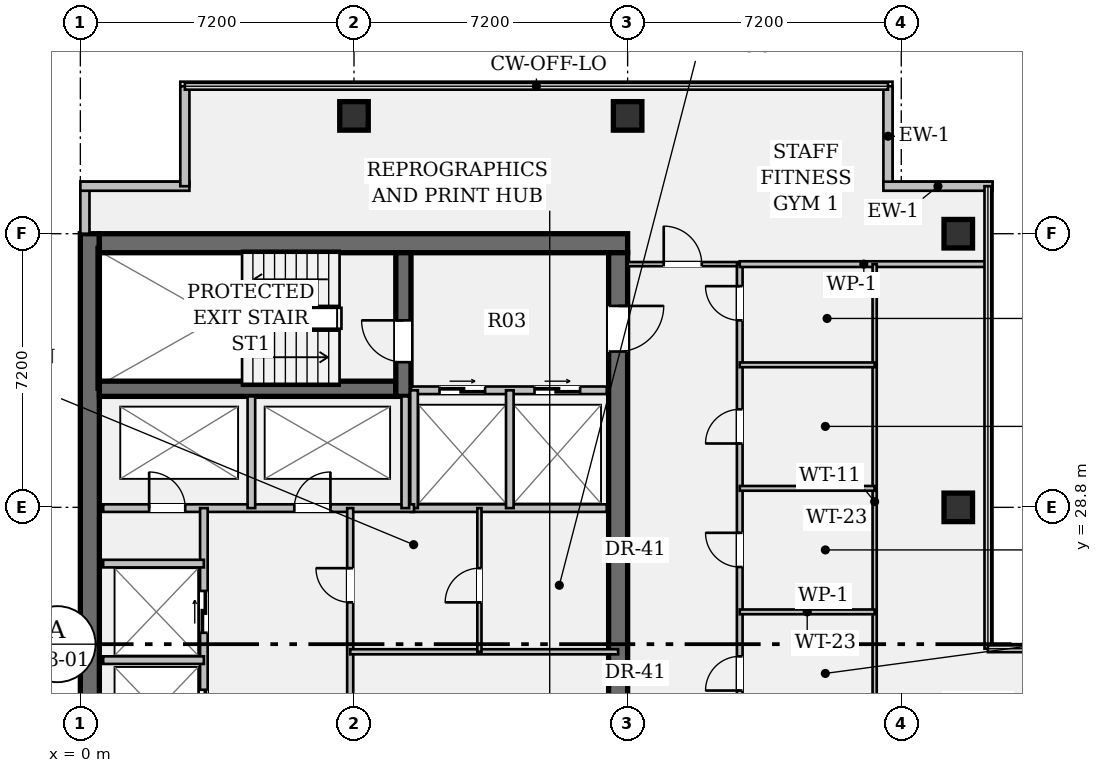
"""IFC4 building model, lengths in metres.
Left out: names, types, materials, properties, quantities, classifications, styles, units other than length and angle.
Written with IfcOpenShell. Run it as: python <this file> out.ifc"""

import sys

from ifc_helpers import new_model, si_unit, direction, frame, frame_2d, origin, origin_2d, place, context, subcontext, project, spatial, rectangle, hollow_rectangle, extrude, element, fill, save


model = new_model("IFC4")
c1 = context("Model", 3, precision=1e-05, world=origin(), true_north=direction((0.0, 1.0)))
c2 = subcontext(c1, "Body", "Model", "MODEL_VIEW")
j1 = project(units=[si_unit("LENGTHUNIT", "METRE"), si_unit("PLANEANGLEUNIT", "RADIAN")], contexts=[c1])
p1 = place(None, origin())
s1 = spatial("IfcSite", under=j1, at=p1, CompositionType="ELEMENT")
p2 = place(p1, origin())
s2 = spatial("IfcBuilding", under=s1, at=p2, CompositionType="ELEMENT")
p3 = place(p2, frame((0.0, 0.0, 215.25)))
s3 = spatial("IfcBuildingStorey", under=s2, at=p3, CompositionType="ELEMENT", Elevation=215.25)
p4 = place(p3, frame((0.25, 7.2, 0.0), z_axis=(0.0, 0.0, 1.0), x_axis=(0.0, 1.0, 0.0)))
e1 = element("IfcWall", 1, at=p4, inside=s3, PredefinedType="SHEAR", context=c2, shape_type="SweptSolid", body=[
    extrude(rectangle(XDim=28.8, YDim=0.5, at=frame_2d((14.4, 0.0))), origin(), (0.0, 0.0, 1.0), 3.24),
])
p5 = place(p3, frame((0.5, 35.75, 0.0), z_axis=(0.0, 0.0, 1.0), x_axis=(1.0, 0.0, 0.0)))
e2 = element("IfcWall", 2, at=p5, inside=s3, PredefinedType="SHEAR", context=c2, shape_type="SweptSolid", body=[
    extrude(rectangle(XDim=13.9, YDim=0.5, at=frame_2d((6.95, 0.0))), origin(), (0.0, 0.0, 1.0), 3.24),
])
p6 = place(p3, frame((14.15, 35.5, 0.0), z_axis=(0.0, 0.0, 1.0), x_axis=(0.0, -1.0, 0.0)))
e3 = element("IfcWall", 3, at=p6, inside=s3, PredefinedType="SHEAR", context=c2, shape_type="SweptSolid", body=[
    extrude(rectangle(XDim=27.8, YDim=0.5, at=frame_2d((13.9, 0.0))), origin(), (0.0, 0.0, 1.0), 3.24),
])
p7 = place(p6, frame((1.4, 0.0, 0.0)))
e4 = element("IfcOpeningElement", 4, at=p7, cuts=e3, PredefinedType="OPENING", context=c2, shape_type="SweptSolid", body=[
    extrude(rectangle(XDim=1.2, YDim=2.15, at=frame_2d((0.6, 1.075))), frame((0.0, 0.262, 0.0), z_axis=(0.0, -1.0, 0.0), x_axis=(1.0, 0.0, 0.0)), (0.0, 0.0, 1.0), 0.524),
])
p8 = place(p6, frame((25.35, 0.0, 0.0)))
e5 = element("IfcOpeningElement", 5, at=p8, cuts=e3, PredefinedType="OPENING", context=c2, shape_type="SweptSolid", body=[
    extrude(rectangle(XDim=1.2, YDim=2.15, at=frame_2d((0.6, 1.075))), frame((0.0, 0.262, 0.0), z_axis=(0.0, -1.0, 0.0), x_axis=(1.0, 0.0, 0.0)), (0.0, 0.0, 1.0), 0.524),
])
p9 = place(p6, frame((14.7, 0.0, 0.0)))
e6 = element("IfcOpeningElement", 6, at=p9, cuts=e3, PredefinedType="OPENING", context=c2, shape_type="SweptSolid", body=[
    extrude(rectangle(XDim=1.6, YDim=2.2, at=frame_2d((0.8, 1.1))), frame((0.0, 0.262, 0.0), z_axis=(0.0, -1.0, 0.0), x_axis=(1.0, 0.0, 0.0)), (0.0, 0.0, 1.0), 0.524),
])
p10 = place(p3, frame((0.5, 31.92, 0.0), z_axis=(0.0, 0.0, 1.0), x_axis=(1.0, 0.0, 0.0)))
e7 = element("IfcWall", 7, at=p10, inside=s3, PredefinedType="SHEAR", context=c2, shape_type="SweptSolid", body=[
    extrude(rectangle(XDim=7.8, YDim=0.4, at=frame_2d((3.9, 0.0))), origin(), (0.0, 0.0, 1.0), 3.24),
])
p11 = place(p3, frame((8.5, 31.72, 0.0), z_axis=(0.0, 0.0, 1.0), x_axis=(0.0, 1.0, 0.0)))
e8 = element("IfcWall", 8, at=p11, inside=s3, PredefinedType="SHEAR", context=c2, shape_type="SweptSolid", body=[
    extrude(rectangle(XDim=3.78, YDim=0.4, at=frame_2d((1.89, 0.0))), origin(), (0.0, 0.0, 1.0), 3.24),
])
p12 = place(p11, frame((0.9, 0.0, 0.0)))
e9 = element("IfcOpeningElement", 9, at=p12, cuts=e8, PredefinedType="OPENING", context=c2, shape_type="SweptSolid", body=[
    extrude(rectangle(XDim=1.1, YDim=2.15, at=frame_2d((0.55, 1.075))), frame((0.0, 0.212, 0.0), z_axis=(0.0, -1.0, 0.0), x_axis=(1.0, 0.0, 0.0)), (0.0, 0.0, 1.0), 0.424),
])
for number, where, z_axis, x_axis in (
    (10, (7.2, 39.1, 0.0), (0.0, 0.0, 1.0), (1.0, 0.0, 0.0)),
    (11, (14.4, 39.1, 0.0), (0.0, 0.0, 1.0), (1.0, 0.0, 0.0)),
    (12, (23.1, 28.8, 0.0), (0.0, 0.0, 1.0), (1.0, 0.0, 0.0)),
    (13, (23.1, 36.0, 0.0), (0.0, 0.0, 1.0), (1.0, 0.0, 0.0)),
):
    element("IfcColumn", number, at=place(p3, frame(where, z_axis=z_axis, x_axis=x_axis)), inside=s3, PredefinedType="COLUMN", context=c2, shape_type="SweptSolid", body=[
        extrude(hollow_rectangle(XDim=0.75, YDim=0.75, WallThickness=0.045, at=origin_2d()), origin(), (0.0, 0.0, 1.0), 3.24),
    ])
p13 = place(p3, frame((0.12, 36.0, 0.0), z_axis=(0.0, 0.0, 1.0), x_axis=(0.0, 1.0, 0.0)))
e14 = element("IfcWall", 14, at=p13, inside=s3, PredefinedType="STANDARD", context=c2, shape_type="SweptSolid", body=[
    extrude(rectangle(XDim=1.25, YDim=0.24, at=frame_2d((0.625, 0.0))), origin(), (0.0, 0.0, 1.0), 3.24),
])
p14 = place(p3, frame((0.0, 37.25, 0.0), z_axis=(0.0, 0.0, 1.0), x_axis=(1.0, 0.0, 0.0)))
e15 = element("IfcWall", 15, at=p14, inside=s3, PredefinedType="STANDARD", context=c2, shape_type="SweptSolid", body=[
    extrude(rectangle(XDim=2.87, YDim=0.24, at=frame_2d((1.435, 0.0))), origin(), (0.0, 0.0, 1.0), 3.24),
])
for number, where, z_axis, x_axis in (
    (16, (2.75, 37.25, 0.0), (0.0, 0.0, 1.0), (0.0, 1.0, 0.0)),
    (17, (21.25, 39.88, 0.0), (0.0, 0.0, 1.0), (0.0, -1.0, 0.0)),
):
    element("IfcWall", number, at=place(p3, frame(where, z_axis=z_axis, x_axis=x_axis)), inside=s3, PredefinedType="STANDARD", context=c2, shape_type="SweptSolid", body=[
        extrude(rectangle(XDim=2.63, YDim=0.24, at=frame_2d((1.315, 0.0))), origin(), (0.0, 0.0, 1.0), 3.24),
    ])
p15 = place(p3, frame((21.13, 37.25, 0.0), z_axis=(0.0, 0.0, 1.0), x_axis=(1.0, 0.0, 0.0)))
e18 = element("IfcWall", 18, at=p15, inside=s3, PredefinedType="STANDARD", context=c2, shape_type="SweptSolid", body=[
    extrude(rectangle(XDim=2.87, YDim=0.24, at=frame_2d((1.435, 0.0))), origin(), (0.0, 0.0, 1.0), 3.24),
])
p16 = place(p3, frame((8.7, 31.88, 0.0), z_axis=(0.0, 0.0, 1.0), x_axis=(1.0, 0.0, 0.0)))
e19 = element("IfcWall", 19, at=p16, inside=s3, PredefinedType="PARTITIONING", context=c2, shape_type="SweptSolid", body=[
    extrude(rectangle(XDim=5.15, YDim=0.2, at=frame_2d((2.575, 0.0))), origin(), (0.0, 0.0, 1.0), 3.24),
])
p17 = place(p16, frame((0.75, 0.0, 0.0)))
e20 = element("IfcOpeningElement", 20, at=p17, cuts=e19, PredefinedType="OPENING", context=c2, shape_type="SweptSolid", body=[
    extrude(rectangle(XDim=1.2, YDim=2.2, at=frame_2d((0.6, 1.1))), frame((0.0, 0.112, 0.0), z_axis=(0.0, -1.0, 0.0), x_axis=(1.0, 0.0, 0.0)), (0.0, 0.0, 1.0), 0.224),
])
p18 = place(p16, frame((3.25, 0.0, 0.0)))
e21 = element("IfcOpeningElement", 21, at=p18, cuts=e19, PredefinedType="OPENING", context=c2, shape_type="SweptSolid", body=[
    extrude(rectangle(XDim=1.2, YDim=2.2, at=frame_2d((0.6, 1.1))), frame((0.0, 0.112, 0.0), z_axis=(0.0, -1.0, 0.0), x_axis=(1.0, 0.0, 0.0)), (0.0, 0.0, 1.0), 0.224),
])
p19 = place(p3, frame((8.7, 28.78, 0.0), z_axis=(0.0, 0.0, 1.0), x_axis=(1.0, 0.0, 0.0)))
e22 = element("IfcWall", 22, at=p19, inside=s3, PredefinedType="PARTITIONING", context=c2, shape_type="SweptSolid", body=[
    extrude(rectangle(XDim=5.15, YDim=0.2, at=frame_2d((2.575, 0.0))), origin(), (0.0, 0.0, 1.0), 3.24),
])
for number, where, z_axis, x_axis in (
    (23, (8.78, 28.78, 0.0), (0.0, 0.0, 1.0), (0.0, 1.0, 0.0)),
    (24, (11.3, 28.78, 0.0), (0.0, 0.0, 1.0), (0.0, 1.0, 0.0)),
):
    element("IfcWall", number, at=place(p3, frame(where, z_axis=z_axis, x_axis=x_axis)), inside=s3, PredefinedType="PARTITIONING", context=c2, shape_type="SweptSolid", body=[
        extrude(rectangle(XDim=3.1, YDim=0.2, at=frame_2d((1.55, 0.0))), origin(), (0.0, 0.0, 1.0), 3.24),
    ])
p20 = place(p3, frame((0.6, 28.78, 0.0), z_axis=(0.0, 0.0, 1.0), x_axis=(1.0, 0.0, 0.0)))
e25 = element("IfcWall", 25, at=p20, inside=s3, PredefinedType="PARTITIONING", context=c2, shape_type="SweptSolid", body=[
    extrude(rectangle(XDim=8.18, YDim=0.2, at=frame_2d((4.09, 0.0))), origin(), (0.0, 0.0, 1.0), 3.24),
])
p21 = place(p20, frame((1.21, 0.0, 0.0)))
e26 = element("IfcOpeningElement", 26, at=p21, cuts=e25, PredefinedType="OPENING", context=c2, shape_type="SweptSolid", body=[
    extrude(rectangle(XDim=0.95, YDim=2.15, at=frame_2d((0.475, 1.075))), frame((0.0, 0.112, 0.0), z_axis=(0.0, -1.0, 0.0), x_axis=(1.0, 0.0, 0.0)), (0.0, 0.0, 1.0), 0.224),
])
p22 = place(p20, frame((5.03, 0.0, 0.0)))
e27 = element("IfcOpeningElement", 27, at=p22, cuts=e25, PredefinedType="OPENING", context=c2, shape_type="SweptSolid", body=[
    extrude(rectangle(XDim=0.95, YDim=2.15, at=frame_2d((0.475, 1.075))), frame((0.0, 0.112, 0.0), z_axis=(0.0, -1.0, 0.0), x_axis=(1.0, 0.0, 0.0)), (0.0, 0.0, 1.0), 0.224),
])
for number, where, z_axis, x_axis in (
    (28, (4.5, 28.78, 0.0), (0.0, 0.0, 1.0), (0.0, 1.0, 0.0)),
    (29, (8.55, 28.78, 0.0), (0.0, 0.0, 1.0), (0.0, 1.0, 0.0)),
):
    element("IfcWall", number, at=place(p3, frame(where, z_axis=z_axis, x_axis=x_axis)), inside=s3, PredefinedType="PARTITIONING", context=c2, shape_type="SweptSolid", body=[
        extrude(rectangle(XDim=2.94, YDim=0.2, at=frame_2d((1.47, 0.0))), origin(), (0.0, 0.0, 1.0), 3.24),
    ])
p23 = place(p3, frame((3.25, 15.7, 0.0), z_axis=(0.0, 0.0, 1.0), x_axis=(0.0, 1.0, 0.0)))
e30 = element("IfcWall", 30, at=p23, inside=s3, PredefinedType="PARTITIONING", context=c2, shape_type="SweptSolid", body=[
    extrude(rectangle(XDim=13.08, YDim=0.2, at=frame_2d((6.54, 0.0))), origin(), (0.0, 0.0, 1.0), 3.24),
])
p24 = place(p23, frame((0.9, 0.0, 0.0)))
e31 = element("IfcOpeningElement", 31, at=p24, cuts=e30, PredefinedType="OPENING", context=c2, shape_type="SweptSolid", body=[
    extrude(rectangle(XDim=1.1, YDim=2.2, at=frame_2d((0.55, 1.1))), frame((0.0, 0.112, 0.0), z_axis=(0.0, -1.0, 0.0), x_axis=(1.0, 0.0, 0.0)), (0.0, 0.0, 1.0), 0.224),
])
p25 = place(p23, frame((3.5, 0.0, 0.0)))
e32 = element("IfcOpeningElement", 32, at=p25, cuts=e30, PredefinedType="OPENING", context=c2, shape_type="SweptSolid", body=[
    extrude(rectangle(XDim=1.1, YDim=2.2, at=frame_2d((0.55, 1.1))), frame((0.0, 0.112, 0.0), z_axis=(0.0, -1.0, 0.0), x_axis=(1.0, 0.0, 0.0)), (0.0, 0.0, 1.0), 0.224),
])
p26 = place(p23, frame((7.2, 0.0, 0.0)))
e33 = element("IfcOpeningElement", 33, at=p26, cuts=e30, PredefinedType="OPENING", context=c2, shape_type="SweptSolid", body=[
    extrude(rectangle(XDim=1.1, YDim=2.2, at=frame_2d((0.55, 1.1))), frame((0.0, 0.112, 0.0), z_axis=(0.0, -1.0, 0.0), x_axis=(1.0, 0.0, 0.0)), (0.0, 0.0, 1.0), 0.224),
])
p27 = place(p23, frame((9.8, 0.0, 0.0)))
e34 = element("IfcOpeningElement", 34, at=p27, cuts=e30, PredefinedType="OPENING", context=c2, shape_type="SweptSolid", body=[
    extrude(rectangle(XDim=1.1, YDim=2.2, at=frame_2d((0.55, 1.1))), frame((0.0, 0.112, 0.0), z_axis=(0.0, -1.0, 0.0), x_axis=(1.0, 0.0, 0.0)), (0.0, 0.0, 1.0), 0.224),
])
for number, where, z_axis, x_axis in (
    (35, (0.6, 24.78, 0.0), (0.0, 0.0, 1.0), (1.0, 0.0, 0.0)),
    (36, (0.6, 27.32, 0.0), (0.0, 0.0, 1.0), (1.0, 0.0, 0.0)),
):
    element("IfcWall", number, at=place(p3, frame(where, z_axis=z_axis, x_axis=x_axis)), inside=s3, PredefinedType="PARTITIONING", context=c2, shape_type="SweptSolid", body=[
        extrude(rectangle(XDim=2.65, YDim=0.2, at=frame_2d((1.325, 0.0))), origin(), (0.0, 0.0, 1.0), 3.24),
    ])
p28 = place(p3, frame((7.1, 22.2, 0.0), z_axis=(0.0, 0.0, 1.0), x_axis=(0.0, 1.0, 0.0)))
e37 = element("IfcWall", 37, at=p28, inside=s3, PredefinedType="PARTITIONING", context=c2, shape_type="SweptSolid", body=[
    extrude(rectangle(XDim=6.58, YDim=0.16, at=frame_2d((3.29, 0.0))), origin(), (0.0, 0.0, 1.0), 3.24),
])
p29 = place(p28, frame((4.1, 0.0, 0.0)))
e38 = element("IfcOpeningElement", 38, at=p29, cuts=e37, PredefinedType="OPENING", context=c2, shape_type="SweptSolid", body=[
    extrude(rectangle(XDim=0.9, YDim=2.15, at=frame_2d((0.45, 1.075))), frame((0.0, 0.092, 0.0), z_axis=(0.0, -1.0, 0.0), x_axis=(1.0, 0.0, 0.0)), (0.0, 0.0, 1.0), 0.184),
])
p30 = place(p3, frame((7.1, 25.0, 0.0), z_axis=(0.0, 0.0, 1.0), x_axis=(1.0, 0.0, 0.0)))
e39 = element("IfcWall", 39, at=p30, inside=s3, PredefinedType="PARTITIONING", context=c2, shape_type="SweptSolid", body=[
    extrude(rectangle(XDim=7.05, YDim=0.135, at=frame_2d((3.525, 0.0))), origin(), (0.0, 0.0, 1.0), 3.24),
])
p31 = place(p3, frame((10.5, 25.0, 0.0), z_axis=(0.0, 0.0, 1.0), x_axis=(0.0, 1.0, 0.0)))
e40 = element("IfcWall", 40, at=p31, inside=s3, PredefinedType="PARTITIONING", context=c2, shape_type="SweptSolid", body=[
    extrude(rectangle(XDim=3.78, YDim=0.11, at=frame_2d((1.89, 0.0))), origin(), (0.0, 0.0, 1.0), 3.24),
])
p32 = place(p31, frame((1.3, 0.0, 0.0)))
e41 = element("IfcOpeningElement", 41, at=p32, cuts=e40, PredefinedType="OPENING", context=c2, shape_type="SweptSolid", body=[
    extrude(rectangle(XDim=0.9, YDim=2.15, at=frame_2d((0.45, 1.075))), frame((0.0, 0.067, 0.0), z_axis=(0.0, -1.0, 0.0), x_axis=(1.0, 0.0, 0.0)), (0.0, 0.0, 1.0), 0.134),
])
p33 = place(p3, frame((14.4, 35.2, 0.0), z_axis=(0.0, 0.0, 1.0), x_axis=(1.0, 0.0, 0.0)))
e42 = element("IfcWall", 42, at=p33, inside=s3, PredefinedType="PARTITIONING", context=c2, shape_type="SweptSolid", body=[
    extrude(rectangle(XDim=2.95, YDim=0.11, at=frame_2d((1.475, 0.0))), origin(), (0.0, 0.0, 1.0), 2.808),
])
p34 = place(p33, frame((0.95, 0.0, 0.0)))
e43 = element("IfcOpeningElement", 43, at=p34, cuts=e42, PredefinedType="OPENING", context=c2, shape_type="SweptSolid", body=[
    extrude(rectangle(XDim=1.0, YDim=2.15, at=frame_2d((0.5, 1.075))), frame((0.0, 0.067, 0.0), z_axis=(0.0, -1.0, 0.0), x_axis=(1.0, 0.0, 0.0)), (0.0, 0.0, 1.0), 0.134),
])
p35 = place(p3, frame((17.35, 17.75, 0.0), z_axis=(0.0, 0.0, 1.0), x_axis=(0.0, 1.0, 0.0)))
e44 = element("IfcWall", 44, at=p35, inside=s3, PredefinedType="PARTITIONING", context=c2, shape_type="SweptSolid", body=[
    extrude(rectangle(XDim=17.45, YDim=0.15, at=frame_2d((8.725, 0.0))), origin(), (0.0, 0.0, 1.0), 2.613),
])
p36 = place(p35, frame((6.23, 0.0, 0.0)))
e45 = element("IfcOpeningElement", 45, at=p36, cuts=e44, PredefinedType="OPENING", context=c2, shape_type="SweptSolid", body=[
    extrude(rectangle(XDim=0.9, YDim=2.15, at=frame_2d((0.45, 1.075))), frame((0.0, 0.087, 0.0), z_axis=(0.0, -1.0, 0.0), x_axis=(1.0, 0.0, 0.0)), (0.0, 0.0, 1.0), 0.174),
])
p37 = place(p35, frame((9.48, 0.0, 0.0)))
e46 = element("IfcOpeningElement", 46, at=p37, cuts=e44, PredefinedType="OPENING", context=c2, shape_type="SweptSolid", body=[
    extrude(rectangle(XDim=0.9, YDim=2.15, at=frame_2d((0.45, 1.075))), frame((0.0, 0.087, 0.0), z_axis=(0.0, -1.0, 0.0), x_axis=(1.0, 0.0, 0.0)), (0.0, 0.0, 1.0), 0.174),
])
p38 = place(p35, frame((12.73, 0.0, 0.0)))
e47 = element("IfcOpeningElement", 47, at=p38, cuts=e44, PredefinedType="OPENING", context=c2, shape_type="SweptSolid", body=[
    extrude(rectangle(XDim=0.9, YDim=2.15, at=frame_2d((0.45, 1.075))), frame((0.0, 0.087, 0.0), z_axis=(0.0, -1.0, 0.0), x_axis=(1.0, 0.0, 0.0)), (0.0, 0.0, 1.0), 0.174),
])
p39 = place(p35, frame((15.97, 0.0, 0.0)))
e48 = element("IfcOpeningElement", 48, at=p39, cuts=e44, PredefinedType="OPENING", context=c2, shape_type="SweptSolid", body=[
    extrude(rectangle(XDim=0.9, YDim=2.15, at=frame_2d((0.45, 1.075))), frame((0.0, 0.087, 0.0), z_axis=(0.0, -1.0, 0.0), x_axis=(1.0, 0.0, 0.0)), (0.0, 0.0, 1.0), 0.174),
])
p40 = place(p3, frame((17.35, 35.2, 0.0), z_axis=(0.0, 0.0, 1.0), x_axis=(1.0, 0.0, 0.0)))
e49 = element("IfcWall", 49, at=p40, inside=s3, PredefinedType="PARTITIONING", context=c2, shape_type="SweptSolid", body=[
    extrude(rectangle(XDim=6.53, YDim=0.15, at=frame_2d((3.265, 0.0))), origin(), (0.0, 0.0, 1.0), 2.808),
])
p41 = place(p3, frame((20.9, 22.7, 0.0), z_axis=(0.0, 0.0, 1.0), x_axis=(0.0, 1.0, 0.0)))
e50 = element("IfcWall", 50, at=p41, inside=s3, PredefinedType="PARTITIONING", context=c2, shape_type="SweptSolid", body=[
    extrude(rectangle(XDim=12.5, YDim=0.11, at=frame_2d((6.25, 0.0))), origin(), (0.0, 0.0, 1.0), 2.613),
])
for number, where, z_axis, x_axis in (
    (51, (17.35, 26.05, 0.0), (0.0, 0.0, 1.0), (1.0, 0.0, 0.0)),
    (52, (17.35, 29.3, 0.0), (0.0, 0.0, 1.0), (1.0, 0.0, 0.0)),
    (53, (17.35, 32.55, 0.0), (0.0, 0.0, 1.0), (1.0, 0.0, 0.0)),
):
    element("IfcWall", number, at=place(p3, frame(where, z_axis=z_axis, x_axis=x_axis)), inside=s3, PredefinedType="PARTITIONING", context=c2, shape_type="SweptSolid", body=[
        extrude(rectangle(XDim=3.55, YDim=0.125, at=frame_2d((1.775, 0.0))), origin(), (0.0, 0.0, 1.0), 2.808),
    ])
p42 = place(p12, origin())
e54 = element("IfcDoor", 54, at=p42, inside=s3, OperationType="SINGLE_SWING_RIGHT", PredefinedType="DOOR", context=c2, shape_type="SweptSolid", body=[
    extrude(rectangle(XDim=1.1, YDim=2.15, at=frame_2d((0.55, 1.075))), frame((0.0, 0.025, 0.0), z_axis=(0.0, -1.0, 0.0), x_axis=(1.0, 0.0, 0.0)), (0.0, 0.0, 1.0), 0.05),
])
fill(e9, e54)
p43 = place(p7, origin())
e55 = element("IfcDoor", 55, at=p43, inside=s3, OperationType="SINGLE_SWING_LEFT", PredefinedType="DOOR", context=c2, shape_type="SweptSolid", body=[
    extrude(rectangle(XDim=1.2, YDim=2.15, at=frame_2d((0.6, 1.075))), frame((0.0, 0.025, 0.0), z_axis=(0.0, -1.0, 0.0), x_axis=(1.0, 0.0, 0.0)), (0.0, 0.0, 1.0), 0.05),
])
fill(e4, e55)
p44 = place(p17, origin())
e56 = element("IfcDoor", 56, at=p44, inside=s3, OperationType="DOUBLE_DOOR_SLIDING", PredefinedType="DOOR", context=c2, shape_type="SweptSolid", body=[
    extrude(rectangle(XDim=1.2, YDim=2.2, at=frame_2d((0.6, 1.1))), frame((0.0, 0.025, 0.0), z_axis=(0.0, -1.0, 0.0), x_axis=(1.0, 0.0, 0.0)), (0.0, 0.0, 1.0), 0.05),
])
fill(e20, e56)
p45 = place(p18, origin())
e57 = element("IfcDoor", 57, at=p45, inside=s3, OperationType="DOUBLE_DOOR_SLIDING", PredefinedType="DOOR", context=c2, shape_type="SweptSolid", body=[
    extrude(rectangle(XDim=1.2, YDim=2.2, at=frame_2d((0.6, 1.1))), frame((0.0, 0.025, 0.0), z_axis=(0.0, -1.0, 0.0), x_axis=(1.0, 0.0, 0.0)), (0.0, 0.0, 1.0), 0.05),
])
fill(e21, e57)
p46 = place(p21, origin())
e58 = element("IfcDoor", 58, at=p46, inside=s3, OperationType="SINGLE_SWING_LEFT", PredefinedType="DOOR", context=c2, shape_type="SweptSolid", body=[
    extrude(rectangle(XDim=0.95, YDim=2.15, at=frame_2d((0.475, 1.075))), frame((0.0, 0.025, 0.0), z_axis=(0.0, -1.0, 0.0), x_axis=(1.0, 0.0, 0.0)), (0.0, 0.0, 1.0), 0.05),
])
fill(e26, e58)
p47 = place(p22, origin())
e59 = element("IfcDoor", 59, at=p47, inside=s3, OperationType="SINGLE_SWING_RIGHT", PredefinedType="DOOR", context=c2, shape_type="SweptSolid", body=[
    extrude(rectangle(XDim=0.95, YDim=2.15, at=frame_2d((0.475, 1.075))), frame((0.0, 0.025, 0.0), z_axis=(0.0, -1.0, 0.0), x_axis=(1.0, 0.0, 0.0)), (0.0, 0.0, 1.0), 0.05),
])
fill(e27, e59)
p48 = place(p26, origin())
e60 = element("IfcDoor", 60, at=p48, inside=s3, OperationType="DOUBLE_DOOR_SLIDING", PredefinedType="DOOR", context=c2, shape_type="SweptSolid", body=[
    extrude(rectangle(XDim=1.1, YDim=2.2, at=frame_2d((0.55, 1.1))), frame((0.0, 0.025, 0.0), z_axis=(0.0, -1.0, 0.0), x_axis=(1.0, 0.0, 0.0)), (0.0, 0.0, 1.0), 0.05),
])
fill(e33, e60)
p49 = place(p27, origin())
e61 = element("IfcDoor", 61, at=p49, inside=s3, OperationType="DOUBLE_DOOR_SLIDING", PredefinedType="DOOR", context=c2, shape_type="SweptSolid", body=[
    extrude(rectangle(XDim=1.1, YDim=2.2, at=frame_2d((0.55, 1.1))), frame((0.0, 0.025, 0.0), z_axis=(0.0, -1.0, 0.0), x_axis=(1.0, 0.0, 0.0)), (0.0, 0.0, 1.0), 0.05),
])
fill(e34, e61)
p50 = place(p29, origin())
e62 = element("IfcDoor", 62, at=p50, inside=s3, OperationType="SINGLE_SWING_RIGHT", PredefinedType="DOOR", context=c2, shape_type="SweptSolid", body=[
    extrude(rectangle(XDim=0.9, YDim=2.15, at=frame_2d((0.45, 1.075))), frame((0.0, 0.025, 0.0), z_axis=(0.0, -1.0, 0.0), x_axis=(1.0, 0.0, 0.0)), (0.0, 0.0, 1.0), 0.05),
])
fill(e38, e62)
p51 = place(p32, origin())
e63 = element("IfcDoor", 63, at=p51, inside=s3, OperationType="SINGLE_SWING_LEFT", PredefinedType="DOOR", context=c2, shape_type="SweptSolid", body=[
    extrude(rectangle(XDim=0.9, YDim=2.15, at=frame_2d((0.45, 1.075))), frame((0.0, 0.025, 0.0), z_axis=(0.0, -1.0, 0.0), x_axis=(1.0, 0.0, 0.0)), (0.0, 0.0, 1.0), 0.05),
])
fill(e41, e63)
p52 = place(p34, origin())
e64 = element("IfcDoor", 64, at=p52, inside=s3, OperationType="SINGLE_SWING_LEFT", PredefinedType="DOOR", context=c2, shape_type="SweptSolid", body=[
    extrude(rectangle(XDim=1.0, YDim=2.15, at=frame_2d((0.5, 1.075))), frame((0.0, 0.025, 0.0), z_axis=(0.0, -1.0, 0.0), x_axis=(1.0, 0.0, 0.0)), (0.0, 0.0, 1.0), 0.05),
])
fill(e43, e64)
p53 = place(p36, origin())
e65 = element("IfcDoor", 65, at=p53, inside=s3, OperationType="SINGLE_SWING_LEFT", PredefinedType="DOOR", context=c2, shape_type="SweptSolid", body=[
    extrude(rectangle(XDim=0.9, YDim=2.15, at=frame_2d((0.45, 1.075))), frame((0.0, 0.025, 0.0), z_axis=(0.0, -1.0, 0.0), x_axis=(1.0, 0.0, 0.0)), (0.0, 0.0, 1.0), 0.05),
])
fill(e45, e65)
p54 = place(p37, origin())
e66 = element("IfcDoor", 66, at=p54, inside=s3, OperationType="SINGLE_SWING_RIGHT", PredefinedType="DOOR", context=c2, shape_type="SweptSolid", body=[
    extrude(rectangle(XDim=0.9, YDim=2.15, at=frame_2d((0.45, 1.075))), frame((0.0, 0.025, 0.0), z_axis=(0.0, -1.0, 0.0), x_axis=(1.0, 0.0, 0.0)), (0.0, 0.0, 1.0), 0.05),
])
fill(e46, e66)
p55 = place(p38, origin())
e67 = element("IfcDoor", 67, at=p55, inside=s3, OperationType="SINGLE_SWING_LEFT", PredefinedType="DOOR", context=c2, shape_type="SweptSolid", body=[
    extrude(rectangle(XDim=0.9, YDim=2.15, at=frame_2d((0.45, 1.075))), frame((0.0, 0.025, 0.0), z_axis=(0.0, -1.0, 0.0), x_axis=(1.0, 0.0, 0.0)), (0.0, 0.0, 1.0), 0.05),
])
fill(e47, e67)
p56 = place(p39, origin())
e68 = element("IfcDoor", 68, at=p56, inside=s3, OperationType="SINGLE_SWING_RIGHT", PredefinedType="DOOR", context=c2, shape_type="SweptSolid", body=[
    extrude(rectangle(XDim=0.9, YDim=2.15, at=frame_2d((0.45, 1.075))), frame((0.0, 0.025, 0.0), z_axis=(0.0, -1.0, 0.0), x_axis=(1.0, 0.0, 0.0)), (0.0, 0.0, 1.0), 0.05),
])
fill(e48, e68)
save(model, sys.argv[1])
